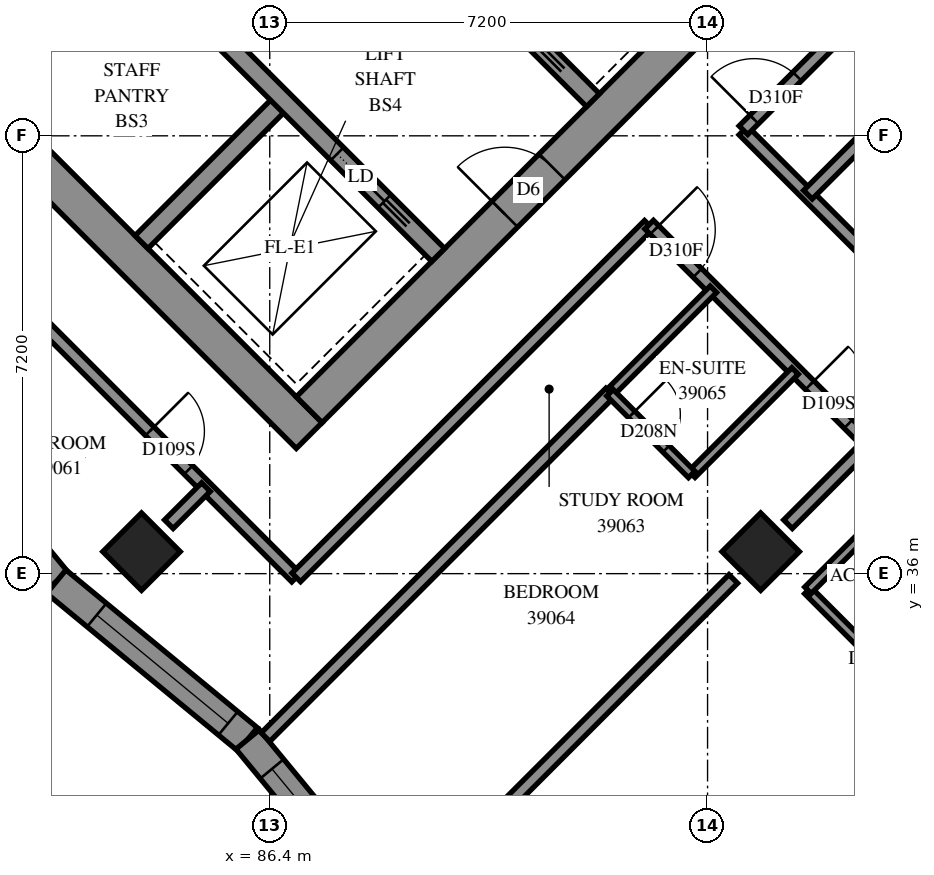
"""IFC4 building model, lengths in metres.
Left out: names, types, materials, properties, quantities, classifications, styles, units other than length and angle.
Written with IfcOpenShell. Run it as: python <this file> out.ifc"""

import sys

from ifc_helpers import new_model, si_unit, direction, frame, frame_2d, origin, origin_2d, place, context, subcontext, project, spatial, polyline, rectangle, outline, extrude, element, fill, save


model = new_model("IFC4")
c1 = context("Model", 3, precision=1e-05, world=origin(), true_north=direction((0.0, 1.0)))
c2 = subcontext(c1, "Body", "Model", "MODEL_VIEW")
j1 = project(units=[si_unit("LENGTHUNIT", "METRE"), si_unit("PLANEANGLEUNIT", "RADIAN")], contexts=[c1])
p1 = place(None, origin())
s1 = spatial("IfcSite", under=j1, at=p1, CompositionType="ELEMENT")
p2 = place(p1, origin())
s2 = spatial("IfcBuilding", under=s1, at=p2, CompositionType="ELEMENT")
p3 = place(p2, frame((0.0, 0.0, 145.6)))
s3 = spatial("IfcBuildingStorey", under=s2, at=p3, CompositionType="ELEMENT", Elevation=145.6)
for number, where, z_axis, x_axis in (
    (1, (84.291, 36.362, 0.0), (0.0, 0.0, 1.0), (0.707, -0.707, 0.0)),
    (2, (94.474, 36.362, 0.0), (0.0, 0.0, 1.0), (0.707, -0.707, 0.0)),
):
    element("IfcColumn", number, at=place(p3, frame(where, z_axis=z_axis, x_axis=x_axis)), inside=s3, PredefinedType="COLUMN", context=c2, shape_type="SweptSolid", body=[
        extrude(rectangle(XDim=0.9, YDim=0.9, at=origin_2d()), origin(), (0.0, 0.0, 1.0), 3.1),
    ])
p4 = place(p3, frame((76.018, 49.302, -0.3), z_axis=(0.0, 0.0, 1.0), x_axis=(0.7071067812, -0.7071067812, 0.0)))
e3 = element("IfcWall", 3, at=p4, inside=s3, PredefinedType="SHEAR", context=c2, shape_type="SweptSolid", body=[
    extrude(rectangle(XDim=15.6, YDim=0.6, at=frame_2d((7.8, 0.0))), origin(), (0.0, 0.0, 1.0), 2.7),
])
p5 = place(p3, frame((87.049, 38.695, -0.3), z_axis=(0.0, 0.0, 1.0), x_axis=(0.7071067812, 0.7071067812, 0.0)))
e4 = element("IfcWall", 4, at=p5, inside=s3, PredefinedType="SHEAR", context=c2, shape_type="SweptSolid", body=[
    extrude(rectangle(XDim=14.4, YDim=0.6, at=frame_2d((7.2, 0.0))), origin(), (0.0, 0.0, 1.0), 2.7),
])
p6 = place(p5, frame((4.55, 0.0, 0.3)))
e5 = element("IfcOpeningElement", 5, at=p6, cuts=e4, PredefinedType="OPENING", context=c2, shape_type="SweptSolid", body=[
    extrude(rectangle(XDim=1.1, YDim=2.1, at=frame_2d((0.55, 1.05))), frame((0.0, 0.31, 0.0), z_axis=(0.0, -1.0, 0.0), x_axis=(1.0, 0.0, 0.0)), (0.0, 0.0, 1.0), 0.62),
])
p7 = place(p5, frame((11.35, 0.0, 0.3)))
e6 = element("IfcOpeningElement", 6, at=p7, cuts=e4, PredefinedType="OPENING", context=c2, shape_type="SweptSolid", body=[
    extrude(rectangle(XDim=1.1, YDim=2.1, at=frame_2d((0.55, 1.05))), frame((0.0, 0.31, 0.0), z_axis=(0.0, -1.0, 0.0), x_axis=(1.0, 0.0, 0.0)), (0.0, 0.0, 1.0), 0.62),
])
for number, where, z_axis, x_axis in (
    (7, (81.746, 43.999, 0.0), (0.0, 0.0, 1.0), (0.707, 0.707, 0.0)),
    (8, (84.291, 41.453, 0.0), (0.0, 0.0, 1.0), (0.707, 0.707, 0.0)),
):
    element("IfcWall", number, at=place(p3, frame(where, z_axis=z_axis, x_axis=x_axis)), inside=s3, PredefinedType="SOLIDWALL", context=c2, shape_type="SweptSolid", body=[
        extrude(rectangle(XDim=3.3, YDim=0.3, at=frame_2d((1.65, 0.0))), origin(), (0.0, 0.0, 1.0), 3.1),
    ])
p8 = place(p3, frame((78.988, 51.423, 0.0), z_axis=(0.0, 0.0, 1.0), x_axis=(0.7071067812, -0.7071067812, 0.0)))
e9 = element("IfcWall", 9, at=p8, inside=s3, PredefinedType="SOLIDWALL", context=c2, shape_type="SweptSolid", body=[
    extrude(rectangle(XDim=14.4, YDim=0.3, at=frame_2d((7.2, 0.0))), origin(), (0.0, 0.0, 1.0), 3.1),
])
p9 = place(p8, frame((1.35, 0.0, 0.0)))
e10 = element("IfcOpeningElement", 10, at=p9, cuts=e9, PredefinedType="OPENING", context=c2, shape_type="SweptSolid", body=[
    extrude(rectangle(XDim=0.9, YDim=2.1, at=frame_2d((0.45, 1.05))), frame((0.0, 0.16, 0.0), z_axis=(0.0, -1.0, 0.0), x_axis=(1.0, 0.0, 0.0)), (0.0, 0.0, 1.0), 0.32),
])
p10 = place(p8, frame((4.95, 0.0, 0.0)))
e11 = element("IfcOpeningElement", 11, at=p10, cuts=e9, PredefinedType="OPENING", context=c2, shape_type="SweptSolid", body=[
    extrude(rectangle(XDim=0.9, YDim=2.1, at=frame_2d((0.45, 1.05))), frame((0.0, 0.16, 0.0), z_axis=(0.0, -1.0, 0.0), x_axis=(1.0, 0.0, 0.0)), (0.0, 0.0, 1.0), 0.32),
])
p11 = place(p8, frame((8.55, 0.0, 0.0)))
e12 = element("IfcOpeningElement", 12, at=p11, cuts=e9, PredefinedType="OPENING", context=c2, shape_type="SweptSolid", body=[
    extrude(rectangle(XDim=0.9, YDim=2.1, at=frame_2d((0.45, 1.05))), frame((0.0, 0.16, 0.0), z_axis=(0.0, -1.0, 0.0), x_axis=(1.0, 0.0, 0.0)), (0.0, 0.0, 1.0), 0.32),
])
p12 = place(p8, frame((12.05, 0.0, 0.0)))
e13 = element("IfcOpeningElement", 13, at=p12, cuts=e9, PredefinedType="OPENING", context=c2, shape_type="SweptSolid", body=[
    extrude(rectangle(XDim=1.1, YDim=2.1, at=frame_2d((0.55, 1.05))), frame((0.0, 0.16, 0.0), z_axis=(0.0, -1.0, 0.0), x_axis=(1.0, 0.0, 0.0)), (0.0, 0.0, 1.0), 0.32),
])
p13 = place(p3, frame((81.534, 53.969, 0.0), z_axis=(0.0, 0.0, 1.0), x_axis=(0.707103309, -0.7071102534, 0.0)))
e14 = element("IfcWall", 14, at=p13, inside=s3, PredefinedType="SOLIDWALL", context=c2, shape_type="SweptSolid", body=[
    extrude(rectangle(XDim=14.4, YDim=0.3, at=frame_2d((7.2, 0.0))), origin(), (0.0, 0.0, 1.0), 3.1),
])
p14 = place(p13, frame((1.25, 0.0, 0.0)))
e15 = element("IfcOpeningElement", 15, at=p14, cuts=e14, PredefinedType="OPENING", context=c2, shape_type="SweptSolid", body=[
    extrude(rectangle(XDim=1.1, YDim=2.1, at=frame_2d((0.55, 1.05))), frame((0.0, 0.16, 0.0), z_axis=(0.0, -1.0, 0.0), x_axis=(1.0, 0.0, 0.0)), (0.0, 0.0, 1.0), 0.32),
])
p15 = place(p13, frame((4.85, 0.0, 0.0)))
e16 = element("IfcOpeningElement", 16, at=p15, cuts=e14, PredefinedType="OPENING", context=c2, shape_type="SweptSolid", body=[
    extrude(rectangle(XDim=1.1, YDim=2.1, at=frame_2d((0.55, 1.05))), frame((0.0, 0.16, 0.0), z_axis=(0.0, -1.0, 0.0), x_axis=(1.0, 0.0, 0.0)), (0.0, 0.0, 1.0), 0.32),
])
p16 = place(p13, frame((8.45, 0.0, 0.0)))
e17 = element("IfcOpeningElement", 17, at=p16, cuts=e14, PredefinedType="OPENING", context=c2, shape_type="SweptSolid", body=[
    extrude(rectangle(XDim=1.1, YDim=2.1, at=frame_2d((0.55, 1.05))), frame((0.0, 0.16, 0.0), z_axis=(0.0, -1.0, 0.0), x_axis=(1.0, 0.0, 0.0)), (0.0, 0.0, 1.0), 0.32),
])
p17 = place(p13, frame((12.05, 0.0, 0.0)))
e18 = element("IfcOpeningElement", 18, at=p17, cuts=e14, PredefinedType="OPENING", context=c2, shape_type="SweptSolid", body=[
    extrude(rectangle(XDim=1.1, YDim=2.1, at=frame_2d((0.55, 1.05))), frame((0.0, 0.16, 0.0), z_axis=(0.0, -1.0, 0.0), x_axis=(1.0, 0.0, 0.0)), (0.0, 0.0, 1.0), 0.32),
])
p18 = place(p3, frame((80.283, 39.03, 0.0), z_axis=(0.0, 0.0, 1.0), x_axis=(0.6360656097, -0.7716349786, 0.0)))
e19 = element("IfcWall", 19, at=p18, inside=s3, PredefinedType="SOLIDWALL", context=c2, shape_type="SweptSolid", body=[
    extrude(outline(polyline([(0.042, -0.25), (4.122, -0.25), (4.074, 0.25), (-0.042, 0.25), (0.042, -0.25)])), origin(), (0.0, 0.0, 1.0), 3.1),
])
p19 = place(p18, frame((1.9, 0.0, 0.45)))
e20 = element("IfcOpeningElement", 20, at=p19, cuts=e19, PredefinedType="OPENING", context=c2, shape_type="SweptSolid", body=[
    extrude(rectangle(XDim=1.2, YDim=2.5, at=frame_2d((0.6, 1.25))), frame((0.0, 0.26, 0.0), z_axis=(0.0, -1.0, 0.0), x_axis=(1.0, 0.0, 0.0)), (0.0, 0.0, 1.0), 0.52),
])
p20 = place(p3, frame((82.89, 35.868, 0.0), z_axis=(0.0, 0.0, 1.0), x_axis=(0.7716322406, -0.6360689312, 0.0)))
e21 = element("IfcWall", 21, at=p20, inside=s3, PredefinedType="SOLIDWALL", context=c2, shape_type="SweptSolid", body=[
    extrude(outline(polyline([(-0.024, -0.25), (4.055, -0.25), (4.103, 0.25), (0.024, 0.25), (-0.024, -0.25)])), origin(), (0.0, 0.0, 1.0), 3.1),
])
p21 = place(p20, frame((0.862, 0.0, 0.45)))
e22 = element("IfcOpeningElement", 22, at=p21, cuts=e21, PredefinedType="OPENING", context=c2, shape_type="SweptSolid", body=[
    extrude(rectangle(XDim=2.8, YDim=2.5, at=frame_2d((1.4, 1.25))), frame((0.0, 0.26, 0.0), z_axis=(0.0, -1.0, 0.0), x_axis=(1.0, 0.0, 0.0)), (0.0, 0.0, 1.0), 0.52),
])
p22 = place(p3, frame((86.037, 33.274, 0.0), z_axis=(0.0, 0.0, 1.0), x_axis=(0.636083527, -0.7716202088, 0.0)))
e23 = element("IfcWall", 23, at=p22, inside=s3, PredefinedType="SOLIDWALL", context=c2, shape_type="SweptSolid", body=[
    extrude(outline(polyline([(0.024, -0.25), (4.103, -0.25), (4.055, 0.25), (-0.024, 0.25), (0.024, -0.25)])), origin(), (0.0, 0.0, 1.0), 3.1),
])
p23 = place(p22, frame((0.628, 0.0, 0.45)))
e24 = element("IfcOpeningElement", 24, at=p23, cuts=e23, PredefinedType="OPENING", context=c2, shape_type="SweptSolid", body=[
    extrude(rectangle(XDim=2.8, YDim=2.5, at=frame_2d((1.4, 1.25))), frame((0.0, 0.26, 0.0), z_axis=(0.0, -1.0, 0.0), x_axis=(1.0, 0.0, 0.0)), (0.0, 0.0, 1.0), 0.52),
])
p24 = place(p3, frame((94.189, 43.287, 0.0), z_axis=(0.0, 0.0, 1.0), x_axis=(0.7071067812, -0.7071067812, 0.0)))
e25 = element("IfcWall", 25, at=p24, inside=s3, PredefinedType="PARTITIONING", context=c2, shape_type="SweptSolid", body=[
    extrude(rectangle(XDim=12.298, YDim=0.2, at=frame_2d((6.149, 0.0))), origin(), (0.0, 0.0, 1.0), 3.1),
])
p25 = place(p24, frame((3.755, 0.0, 0.0)))
e26 = element("IfcOpeningElement", 26, at=p25, cuts=e25, PredefinedType="OPENING", context=c2, shape_type="SweptSolid", body=[
    extrude(rectangle(XDim=0.9, YDim=2.1, at=frame_2d((0.45, 1.05))), frame((0.0, 0.11, 0.0), z_axis=(0.0, -1.0, 0.0), x_axis=(1.0, 0.0, 0.0)), (0.0, 0.0, 1.0), 0.22),
])
p26 = place(p24, frame((10.998, 0.0, 0.0)))
e27 = element("IfcOpeningElement", 27, at=p26, cuts=e25, PredefinedType="OPENING", context=c2, shape_type="SweptSolid", body=[
    extrude(rectangle(XDim=0.9, YDim=2.1, at=frame_2d((0.45, 1.05))), frame((0.0, 0.11, 0.0), z_axis=(0.0, -1.0, 0.0), x_axis=(1.0, 0.0, 0.0)), (0.0, 0.0, 1.0), 0.22),
])
p27 = place(p3, frame((95.25, 42.232, 0.0), z_axis=(0.0, 0.0, 1.0), x_axis=(0.7071114386, 0.7071021238, 0.0)))
e28 = element("IfcWall", 28, at=p27, inside=s3, PredefinedType="PARTITIONING", context=c2, shape_type="SweptSolid", body=[
    extrude(rectangle(XDim=10.736, YDim=0.2, at=frame_2d((5.368, 0.0))), origin(), (0.0, 0.0, 1.0), 3.1),
])
p28 = place(p3, frame((80.899, 41.869, 0.0), z_axis=(0.0, 0.0, 1.0), x_axis=(0.7071067812, -0.7071067812, 0.0)))
e29 = element("IfcWall", 29, at=p28, inside=s3, PredefinedType="PARTITIONING", context=c2, shape_type="SweptSolid", body=[
    extrude(rectangle(XDim=8.392, YDim=0.2, at=frame_2d((4.196, 0.0))), origin(), (0.0, 0.0, 1.0), 3.1),
])
p29 = place(p28, frame((4.988, 0.0, 0.0)))
e30 = element("IfcOpeningElement", 30, at=p29, cuts=e29, PredefinedType="OPENING", context=c2, shape_type="SweptSolid", body=[
    extrude(rectangle(XDim=0.9, YDim=2.1, at=frame_2d((0.45, 1.05))), frame((0.0, 0.11, 0.0), z_axis=(0.0, -1.0, 0.0), x_axis=(1.0, 0.0, 0.0)), (0.0, 0.0, 1.0), 0.22),
])
p30 = place(p3, frame((94.19, 43.292, 0.0), z_axis=(0.0, 0.0, 1.0), x_axis=(0.7071067812, 0.7071067812, 0.0)))
e31 = element("IfcWall", 31, at=p30, inside=s3, PredefinedType="PARTITIONING", context=c2, shape_type="SweptSolid", body=[
    extrude(rectangle(XDim=8.2, YDim=0.2, at=frame_2d((4.1, 0.0))), origin(), (0.0, 0.0, 1.0), 3.1),
])
p31 = place(p30, frame((0.251, 0.0, 0.0)))
e32 = element("IfcOpeningElement", 32, at=p31, cuts=e31, PredefinedType="OPENING", context=c2, shape_type="SweptSolid", body=[
    extrude(rectangle(XDim=1.0, YDim=2.1, at=frame_2d((0.5, 1.05))), frame((0.0, 0.11, 0.0), z_axis=(0.0, -1.0, 0.0), x_axis=(1.0, 0.0, 0.0)), (0.0, 0.0, 1.0), 0.22),
])
p32 = place(p3, frame((86.836, 35.938, 0.0), z_axis=(0.0, 0.0, 1.0), x_axis=(0.7071067812, 0.7071067812, 0.0)))
e33 = element("IfcWall", 33, at=p32, inside=s3, PredefinedType="PARTITIONING", context=c2, shape_type="SweptSolid", body=[
    extrude(rectangle(XDim=8.2, YDim=0.2, at=frame_2d((4.1, 0.0))), origin(), (0.0, 0.0, 1.0), 3.1),
])
p33 = place(p3, frame((86.33, 33.311, 0.0), z_axis=(0.0, 0.0, 1.0), x_axis=(0.7071005425, 0.7071130198, 0.0)))
e34 = element("IfcWall", 34, at=p33, inside=s3, PredefinedType="PARTITIONING", context=c2, shape_type="SweptSolid", body=[
    extrude(rectangle(XDim=8.015, YDim=0.2, at=frame_2d((4.007, 0.0))), origin(), (0.0, 0.0, 1.0), 3.1),
])
p34 = place(p3, frame((89.831, 31.721, 0.0), z_axis=(0.0, 0.0, 1.0), x_axis=(0.7071067812, 0.7071067812, 0.0)))
e35 = element("IfcWall", 35, at=p34, inside=s3, PredefinedType="PARTITIONING", context=c2, shape_type="SweptSolid", body=[
    extrude(rectangle(XDim=5.928, YDim=0.2, at=frame_2d((2.964, 0.0))), origin(), (0.0, 0.0, 1.0), 3.1),
])
p35 = place(p3, frame((92.639, 41.739, 0.0), z_axis=(0.0, 0.0, 1.0), x_axis=(0.7071067812, -0.7071067812, 0.0)))
e36 = element("IfcWall", 36, at=p35, inside=s3, PredefinedType="PARTITIONING", context=c2, shape_type="SweptSolid", body=[
    extrude(rectangle(XDim=5.1, YDim=0.2, at=frame_2d((2.55, 0.0))), origin(), (0.0, 0.0, 1.0), 3.1),
])
p36 = place(p35, frame((0.123, 0.0, 0.0)))
e37 = element("IfcOpeningElement", 37, at=p36, cuts=e36, PredefinedType="OPENING", context=c2, shape_type="SweptSolid", body=[
    extrude(rectangle(XDim=1.0, YDim=2.1, at=frame_2d((0.5, 1.05))), frame((0.0, 0.11, 0.0), z_axis=(0.0, -1.0, 0.0), x_axis=(1.0, 0.0, 0.0)), (0.0, 0.0, 1.0), 0.22),
])
p37 = place(p35, frame((3.734, 0.0, 0.0)))
e38 = element("IfcOpeningElement", 38, at=p37, cuts=e36, PredefinedType="OPENING", context=c2, shape_type="SweptSolid", body=[
    extrude(rectangle(XDim=0.9, YDim=2.1, at=frame_2d((0.45, 1.05))), frame((0.0, 0.11, 0.0), z_axis=(0.0, -1.0, 0.0), x_axis=(1.0, 0.0, 0.0)), (0.0, 0.0, 1.0), 0.22),
])
p38 = place(p3, frame((95.249, 35.723, 0.0), z_axis=(0.0, 0.0, 1.0), x_axis=(0.7067942478, -0.7074191764, 0.0)))
e39 = element("IfcWall", 39, at=p38, inside=s3, PredefinedType="PARTITIONING", context=c2, shape_type="SweptSolid", body=[
    extrude(rectangle(XDim=3.2, YDim=0.15, at=frame_2d((1.6, 0.0))), origin(), (0.0, 0.0, 1.0), 3.1),
])
p39 = place(p38, frame((1.206, 0.0, 0.0)))
e40 = element("IfcOpeningElement", 40, at=p39, cuts=e39, PredefinedType="OPENING", context=c2, shape_type="SweptSolid", body=[
    extrude(rectangle(XDim=0.8, YDim=2.1, at=frame_2d((0.4, 1.05))), frame((0.0, 0.085, 0.0), z_axis=(0.0, -1.0, 0.0), x_axis=(1.0, 0.0, 0.0)), (0.0, 0.0, 1.0), 0.17),
])
for number, where, z_axis, x_axis in (
    (41, (93.341, 37.635, 0.0), (0.0, 0.0, 1.0), (0.707, 0.707, 0.0)),
    (42, (91.997, 38.979, 0.0), (0.0, 0.0, 1.0), (0.707, 0.707, 0.0)),
):
    element("IfcWall", number, at=place(p3, frame(where, z_axis=z_axis, x_axis=x_axis)), inside=s3, PredefinedType="PARTITIONING", context=c2, shape_type="SweptSolid", body=[
        extrude(rectangle(XDim=2.401, YDim=0.15, at=frame_2d((1.201, 0.0))), origin(), (0.0, 0.0, 1.0), 3.1),
    ])
p40 = place(p3, frame((95.251, 35.727, 0.0), z_axis=(0.0, 0.0, 1.0), x_axis=(0.7071067812, 0.7071067812, 0.0)))
e43 = element("IfcWall", 43, at=p40, inside=s3, PredefinedType="PARTITIONING", context=c2, shape_type="SweptSolid", body=[
    extrude(rectangle(XDim=2.398, YDim=0.15, at=frame_2d((1.199, 0.0))), origin(), (0.0, 0.0, 1.0), 3.1),
])
p41 = place(p3, frame((91.995, 38.975, 0.0), z_axis=(0.0, 0.0, 1.0), x_axis=(0.7071067812, -0.7071067812, 0.0)))
e44 = element("IfcWall", 44, at=p41, inside=s3, PredefinedType="PARTITIONING", context=c2, shape_type="SweptSolid", body=[
    extrude(rectangle(XDim=1.901, YDim=0.15, at=frame_2d((0.95, 0.0))), origin(), (0.0, 0.0, 1.0), 3.1),
])
p42 = place(p41, frame((0.506, 0.0, 0.0)))
e45 = element("IfcOpeningElement", 45, at=p42, cuts=e44, PredefinedType="OPENING", context=c2, shape_type="SweptSolid", body=[
    extrude(rectangle(XDim=0.8, YDim=2.1, at=frame_2d((0.4, 1.05))), frame((0.0, 0.085, 0.0), z_axis=(0.0, -1.0, 0.0), x_axis=(1.0, 0.0, 0.0)), (0.0, 0.0, 1.0), 0.17),
])
p43 = place(p3, frame((94.923, 36.813, 0.0), z_axis=(0.0, 0.0, 1.0), x_axis=(0.7071067812, 0.7071067812, 0.0)))
e46 = element("IfcWall", 46, at=p43, inside=s3, PredefinedType="PARTITIONING", context=c2, shape_type="SweptSolid", body=[
    extrude(rectangle(XDim=1.864, YDim=0.2, at=frame_2d((0.932, 0.0))), origin(), (0.0, 0.0, 1.0), 3.1),
])
p44 = place(p3, frame((84.741, 36.813, 0.0), z_axis=(0.0, 0.0, 1.0), x_axis=(0.7071067812, 0.7071067812, 0.0)))
e47 = element("IfcWall", 47, at=p44, inside=s3, PredefinedType="PARTITIONING", context=c2, shape_type="SweptSolid", body=[
    extrude(rectangle(XDim=0.863, YDim=0.2, at=frame_2d((0.431, 0.0))), origin(), (0.0, 0.0, 1.0), 3.1),
])
p45 = place(p21, origin())
e48 = element("IfcWindow", 48, at=p45, inside=s3, PartitioningType="SINGLE_PANEL", PredefinedType="WINDOW", context=c2, shape_type="SweptSolid", body=[
    extrude(rectangle(XDim=2.8, YDim=2.5, at=frame_2d((1.4, 1.25))), frame((0.0, 0.18, 0.0), z_axis=(0.0, -1.0, 0.0), x_axis=(1.0, 0.0, 0.0)), (0.0, 0.0, 1.0), 0.06),
])
fill(e22, e48)
p46 = place(p23, origin())
e49 = element("IfcWindow", 49, at=p46, inside=s3, PartitioningType="SINGLE_PANEL", PredefinedType="WINDOW", context=c2, shape_type="SweptSolid", body=[
    extrude(rectangle(XDim=2.8, YDim=2.5, at=frame_2d((1.4, 1.25))), frame((0.0, 0.18, 0.0), z_axis=(0.0, -1.0, 0.0), x_axis=(1.0, 0.0, 0.0)), (0.0, 0.0, 1.0), 0.06),
])
fill(e24, e49)
p47 = place(p6, origin())
e50 = element("IfcDoor", 50, at=p47, inside=s3, OperationType="DOUBLE_DOOR_SINGLE_SWING", PredefinedType="DOOR", context=c2, shape_type="SweptSolid", body=[
    extrude(rectangle(XDim=1.1, YDim=2.1, at=frame_2d((0.55, 1.05))), frame((0.0, 0.025, 0.0), z_axis=(0.0, -1.0, 0.0), x_axis=(1.0, 0.0, 0.0)), (0.0, 0.0, 1.0), 0.05),
])
fill(e5, e50)
p48 = place(p12, origin())
e51 = element("IfcDoor", 51, at=p48, inside=s3, OperationType="SLIDING_TO_RIGHT", PredefinedType="DOOR", context=c2, shape_type="SweptSolid", body=[
    extrude(rectangle(XDim=1.1, YDim=2.1, at=frame_2d((0.55, 1.05))), frame((0.0, 0.025, 0.0), z_axis=(0.0, -1.0, 0.0), x_axis=(1.0, 0.0, 0.0)), (0.0, 0.0, 1.0), 0.05),
])
fill(e13, e51)
p49 = place(p31, origin())
e52 = element("IfcDoor", 52, at=p49, inside=s3, OperationType="SINGLE_SWING_RIGHT", PredefinedType="DOOR", context=c2, shape_type="SweptSolid", body=[
    extrude(rectangle(XDim=1.0, YDim=2.1, at=frame_2d((0.5, 1.05))), frame((0.0, 0.025, 0.0), z_axis=(0.0, -1.0, 0.0), x_axis=(1.0, 0.0, 0.0)), (0.0, 0.0, 1.0), 0.05),
])
fill(e32, e52)
p50 = place(p29, origin())
e53 = element("IfcDoor", 53, at=p50, inside=s3, OperationType="SINGLE_SWING_RIGHT", PredefinedType="DOOR", context=c2, shape_type="SweptSolid", body=[
    extrude(rectangle(XDim=0.9, YDim=2.1, at=frame_2d((0.45, 1.05))), frame((0.0, 0.025, 0.0), z_axis=(0.0, -1.0, 0.0), x_axis=(1.0, 0.0, 0.0)), (0.0, 0.0, 1.0), 0.05),
])
fill(e30, e53)
p51 = place(p36, origin())
e54 = element("IfcDoor", 54, at=p51, inside=s3, OperationType="SINGLE_SWING_RIGHT", PredefinedType="DOOR", context=c2, shape_type="SweptSolid", body=[
    extrude(rectangle(XDim=1.0, YDim=2.1, at=frame_2d((0.5, 1.05))), frame((0.0, 0.025, 0.0), z_axis=(0.0, -1.0, 0.0), x_axis=(1.0, 0.0, 0.0)), (0.0, 0.0, 1.0), 0.05),
])
fill(e37, e54)
p52 = place(p37, origin())
e55 = element("IfcDoor", 55, at=p52, inside=s3, OperationType="SINGLE_SWING_LEFT", PredefinedType="DOOR", context=c2, shape_type="SweptSolid", body=[
    extrude(rectangle(XDim=0.9, YDim=2.1, at=frame_2d((0.45, 1.05))), frame((0.0, 0.025, 0.0), z_axis=(0.0, -1.0, 0.0), x_axis=(1.0, 0.0, 0.0)), (0.0, 0.0, 1.0), 0.05),
])
fill(e38, e55)
p53 = place(p42, origin())
e56 = element("IfcDoor", 56, at=p53, inside=s3, OperationType="SINGLE_SWING_RIGHT", PredefinedType="DOOR", context=c2, shape_type="SweptSolid", body=[
    extrude(rectangle(XDim=0.8, YDim=2.1, at=frame_2d((0.4, 1.05))), frame((0.0, 0.025, 0.0), z_axis=(0.0, -1.0, 0.0), x_axis=(1.0, 0.0, 0.0)), (0.0, 0.0, 1.0), 0.05),
])
fill(e45, e56)
save(model, sys.argv[1])
